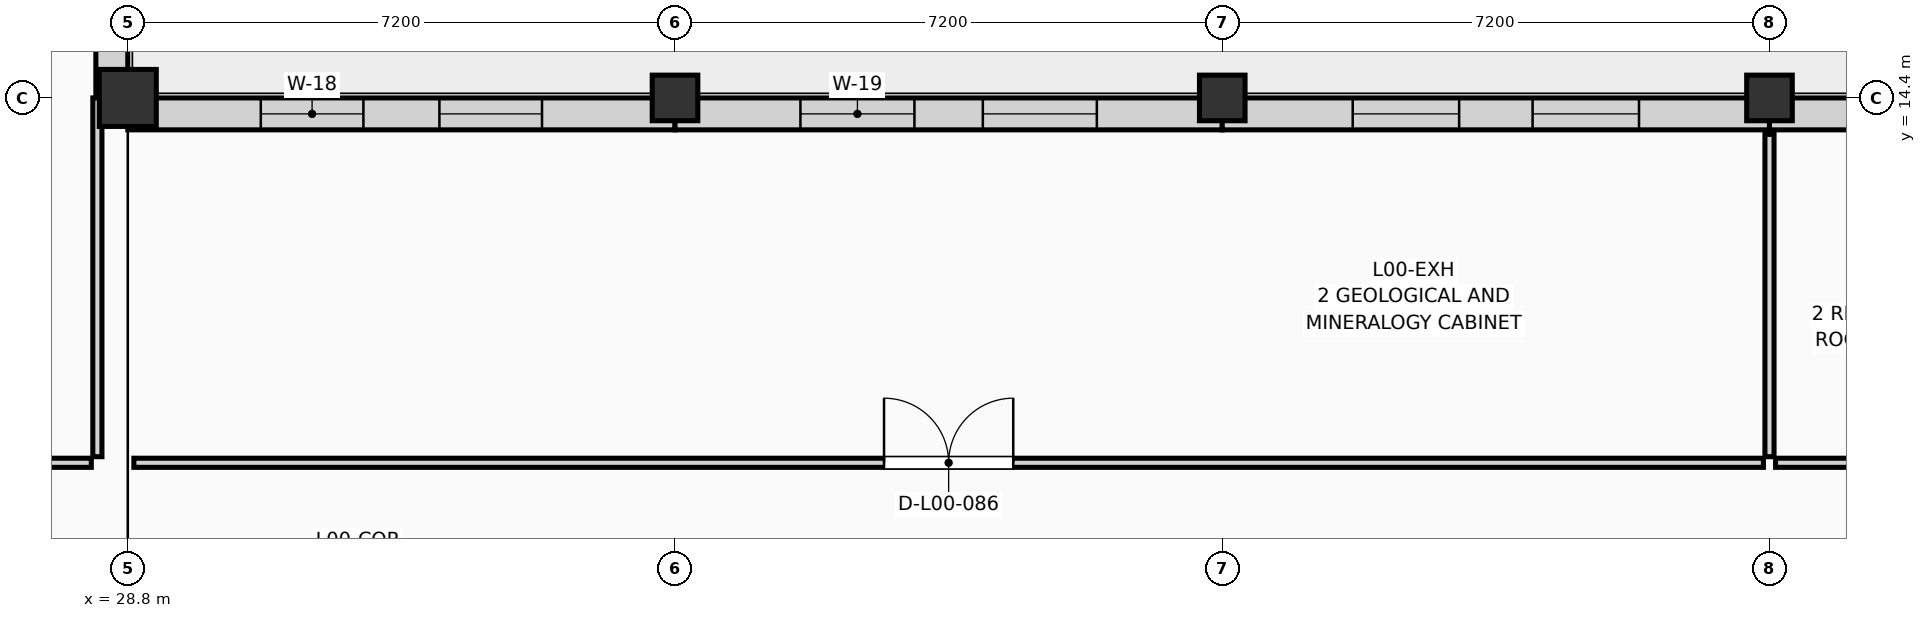
"""IFC4 building model, lengths in metres.
Left out: names, types, materials, properties, quantities, classifications, styles, units other than length and angle.
Written with IfcOpenShell. Run it as: python <this file> out.ifc"""

import sys

from ifc_helpers import new_model, si_unit, direction, frame, frame_2d, origin, origin_2d, place, context, subcontext, project, spatial, rectangle, extrude, element, fill, save


model = new_model("IFC4")
c1 = context("Model", 3, precision=1e-05, world=origin(), true_north=direction((0.0, 1.0)))
c2 = subcontext(c1, "Body", "Model", "MODEL_VIEW")
j1 = project(units=[si_unit("LENGTHUNIT", "METRE"), si_unit("PLANEANGLEUNIT", "RADIAN")], contexts=[c1])
p1 = place(None, origin())
s1 = spatial("IfcSite", under=j1, at=p1, CompositionType="ELEMENT")
p2 = place(p1, origin())
s2 = spatial("IfcBuilding", under=s1, at=p2, CompositionType="ELEMENT")
p3 = place(p2, origin())
s3 = spatial("IfcBuildingStorey", under=s2, at=p3, CompositionType="ELEMENT", Elevation=0.0)
p4 = place(p3, frame((28.8, 14.4, 0.0), z_axis=(0.0, 0.0, 1.0), x_axis=(1.0, 0.0, 0.0)))
e1 = element("IfcColumn", 1, at=p4, inside=s3, PredefinedType="COLUMN", context=c2, shape_type="SweptSolid", body=[
    extrude(rectangle(XDim=0.75, YDim=0.75, at=origin_2d()), origin(), (0.0, 0.0, 1.0), 4.5),
])
for number, where, z_axis, x_axis in (
    (2, (36.0, 14.4, 0.0), (0.0, 0.0, 1.0), (1.0, 0.0, 0.0)),
    (3, (43.2, 14.4, 0.0), (0.0, 0.0, 1.0), (1.0, 0.0, 0.0)),
    (4, (50.4, 14.4, 0.0), (0.0, 0.0, 1.0), (1.0, 0.0, 0.0)),
):
    element("IfcColumn", number, at=place(p3, frame(where, z_axis=z_axis, x_axis=x_axis)), inside=s3, PredefinedType="COLUMN", context=c2, shape_type="SweptSolid", body=[
        extrude(rectangle(XDim=0.6, YDim=0.6, at=origin_2d()), origin(), (0.0, 0.0, 1.0), 4.5),
    ])
p5 = place(p3, frame((28.59, 14.4, 0.0), z_axis=(0.0, 0.0, 1.0), x_axis=(0.0, 1.0, 0.0)))
e5 = element("IfcWall", 5, at=p5, inside=s3, PredefinedType="SOLIDWALL", context=c2, shape_type="SweptSolid", body=[
    extrude(rectangle(XDim=7.2, YDim=0.42, at=frame_2d((3.6, 0.0))), origin(), (0.0, 0.0, 1.0), 3.62),
])
p6 = place(p5, frame((0.962, 0.0, 0.18)))
e6 = element("IfcOpeningElement", 6, at=p6, cuts=e5, PredefinedType="OPENING", context=c2, shape_type="SweptSolid", body=[
    extrude(rectangle(XDim=1.55, YDim=3.25, at=frame_2d((0.775, 1.625))), frame((0.0, 0.222, 0.0), z_axis=(0.0, -1.0, 0.0), x_axis=(1.0, 0.0, 0.0)), (0.0, 0.0, 1.0), 0.444),
])
p7 = place(p5, frame((2.825, 0.0, 0.18)))
e7 = element("IfcOpeningElement", 7, at=p7, cuts=e5, PredefinedType="OPENING", context=c2, shape_type="SweptSolid", body=[
    extrude(rectangle(XDim=1.55, YDim=3.25, at=frame_2d((0.775, 1.625))), frame((0.0, 0.222, 0.0), z_axis=(0.0, -1.0, 0.0), x_axis=(1.0, 0.0, 0.0)), (0.0, 0.0, 1.0), 0.444),
])
p8 = place(p5, frame((4.688, 0.0, 0.18)))
e8 = element("IfcOpeningElement", 8, at=p8, cuts=e5, PredefinedType="OPENING", context=c2, shape_type="SweptSolid", body=[
    extrude(rectangle(XDim=1.55, YDim=3.25, at=frame_2d((0.775, 1.625))), frame((0.0, 0.222, 0.0), z_axis=(0.0, -1.0, 0.0), x_axis=(1.0, 0.0, 0.0)), (0.0, 0.0, 1.0), 0.444),
])
p9 = place(p3, frame((28.8, 14.19, 0.0), z_axis=(0.0, 0.0, 1.0), x_axis=(1.0, 0.0, 0.0)))
e9 = element("IfcWall", 9, at=p9, inside=s3, PredefinedType="SOLIDWALL", context=c2, shape_type="SweptSolid", body=[
    extrude(rectangle(XDim=7.2, YDim=0.42, at=frame_2d((3.6, 0.0))), origin(), (0.0, 0.0, 1.0), 3.62),
])
p10 = place(p9, frame((1.75, 0.0, 0.45)))
e10 = element("IfcOpeningElement", 10, at=p10, cuts=e9, PredefinedType="OPENING", context=c2, shape_type="SweptSolid", body=[
    extrude(rectangle(XDim=1.35, YDim=2.45, at=frame_2d((0.675, 1.225))), frame((0.0, 0.222, 0.0), z_axis=(0.0, -1.0, 0.0), x_axis=(1.0, 0.0, 0.0)), (0.0, 0.0, 1.0), 0.444),
])
p11 = place(p9, frame((4.1, 0.0, 0.45)))
e11 = element("IfcOpeningElement", 11, at=p11, cuts=e9, PredefinedType="OPENING", context=c2, shape_type="SweptSolid", body=[
    extrude(rectangle(XDim=1.35, YDim=2.45, at=frame_2d((0.675, 1.225))), frame((0.0, 0.222, 0.0), z_axis=(0.0, -1.0, 0.0), x_axis=(1.0, 0.0, 0.0)), (0.0, 0.0, 1.0), 0.444),
])
p12 = place(p3, frame((36.0, 14.19, 0.0), z_axis=(0.0, 0.0, 1.0), x_axis=(1.0, 0.0, 0.0)))
e12 = element("IfcWall", 12, at=p12, inside=s3, PredefinedType="SOLIDWALL", context=c2, shape_type="SweptSolid", body=[
    extrude(rectangle(XDim=7.2, YDim=0.42, at=frame_2d((3.6, 0.0))), origin(), (0.0, 0.0, 1.0), 3.62),
])
p13 = place(p12, frame((1.65, 0.0, 0.45)))
e13 = element("IfcOpeningElement", 13, at=p13, cuts=e12, PredefinedType="OPENING", context=c2, shape_type="SweptSolid", body=[
    extrude(rectangle(XDim=1.5, YDim=2.4, at=frame_2d((0.75, 1.2))), frame((0.0, 0.222, 0.0), z_axis=(0.0, -1.0, 0.0), x_axis=(1.0, 0.0, 0.0)), (0.0, 0.0, 1.0), 0.444),
])
p14 = place(p12, frame((4.05, 0.0, 0.45)))
e14 = element("IfcOpeningElement", 14, at=p14, cuts=e12, PredefinedType="OPENING", context=c2, shape_type="SweptSolid", body=[
    extrude(rectangle(XDim=1.5, YDim=2.4, at=frame_2d((0.75, 1.2))), frame((0.0, 0.222, 0.0), z_axis=(0.0, -1.0, 0.0), x_axis=(1.0, 0.0, 0.0)), (0.0, 0.0, 1.0), 0.444),
])
p15 = place(p3, frame((43.2, 14.19, 0.0), z_axis=(0.0, 0.0, 1.0), x_axis=(1.0, 0.0, 0.0)))
e15 = element("IfcWall", 15, at=p15, inside=s3, PredefinedType="SOLIDWALL", context=c2, shape_type="SweptSolid", body=[
    extrude(rectangle(XDim=7.2, YDim=0.42, at=frame_2d((3.6, 0.0))), origin(), (0.0, 0.0, 1.0), 3.62),
])
p16 = place(p15, frame((1.717, 0.0, 0.45)))
e16 = element("IfcOpeningElement", 16, at=p16, cuts=e15, PredefinedType="OPENING", context=c2, shape_type="SweptSolid", body=[
    extrude(rectangle(XDim=1.4, YDim=2.38, at=frame_2d((0.7, 1.19))), frame((0.0, 0.222, 0.0), z_axis=(0.0, -1.0, 0.0), x_axis=(1.0, 0.0, 0.0)), (0.0, 0.0, 1.0), 0.444),
])
p17 = place(p15, frame((4.083, 0.0, 0.45)))
e17 = element("IfcOpeningElement", 17, at=p17, cuts=e15, PredefinedType="OPENING", context=c2, shape_type="SweptSolid", body=[
    extrude(rectangle(XDim=1.4, YDim=2.38, at=frame_2d((0.7, 1.19))), frame((0.0, 0.222, 0.0), z_axis=(0.0, -1.0, 0.0), x_axis=(1.0, 0.0, 0.0)), (0.0, 0.0, 1.0), 0.444),
])
p18 = place(p3, frame((50.4, 14.19, 0.0), z_axis=(0.0, 0.0, 1.0), x_axis=(1.0, 0.0, 0.0)))
e18 = element("IfcWall", 18, at=p18, inside=s3, PredefinedType="SOLIDWALL", context=c2, shape_type="SweptSolid", body=[
    extrude(rectangle(XDim=7.2, YDim=0.42, at=frame_2d((3.6, 0.0))), origin(), (0.0, 0.0, 1.0), 3.62),
])
p19 = place(p18, frame((2.4, 0.0, 0.0)))
e19 = element("IfcOpeningElement", 19, at=p19, cuts=e18, PredefinedType="OPENING", context=c2, shape_type="SweptSolid", body=[
    extrude(rectangle(XDim=2.4, YDim=2.6, at=frame_2d((1.2, 1.3))), frame((0.0, 0.222, 0.0), z_axis=(0.0, -1.0, 0.0), x_axis=(1.0, 0.0, 0.0)), (0.0, 0.0, 1.0), 0.444),
])
p20 = place(p3, frame((20.48, 9.6, 0.0), z_axis=(0.0, 0.0, 1.0), x_axis=(1.0, 0.0, 0.0)))
e20 = element("IfcWall", 20, at=p20, inside=s3, PredefinedType="PARTITIONING", context=c2, shape_type="SweptSolid", body=[
    extrude(rectangle(XDim=7.84, YDim=0.12, at=frame_2d((3.92, 0.0))), origin(), (0.0, 0.0, 1.0), 4.235),
])
p21 = place(p20, frame((3.29, 0.0, 0.0)))
e21 = element("IfcOpeningElement", 21, at=p21, cuts=e20, PredefinedType="OPENING", context=c2, shape_type="SweptSolid", body=[
    extrude(rectangle(XDim=1.26, YDim=2.18, at=frame_2d((0.63, 1.09))), frame((0.0, 0.072, 0.0), z_axis=(0.0, -1.0, 0.0), x_axis=(1.0, 0.0, 0.0)), (0.0, 0.0, 1.0), 0.144),
])
p22 = place(p3, frame((28.4, 9.68, 0.0), z_axis=(0.0, 0.0, 1.0), x_axis=(0.0, 1.0, 0.0)))
e22 = element("IfcWall", 22, at=p22, inside=s3, PredefinedType="PARTITIONING", context=c2, shape_type="SweptSolid", body=[
    extrude(rectangle(XDim=4.72, YDim=0.12, at=frame_2d((2.36, 0.0))), origin(), (0.0, 0.0, 1.0), 3.385),
])
p23 = place(p3, frame((28.88, 9.6, 0.0), z_axis=(0.0, 0.0, 1.0), x_axis=(1.0, 0.0, 0.0)))
e23 = element("IfcWall", 23, at=p23, inside=s3, PredefinedType="PARTITIONING", context=c2, shape_type="SweptSolid", body=[
    extrude(rectangle(XDim=21.44, YDim=0.12, at=frame_2d((10.72, 0.0))), origin(), (0.0, 0.0, 1.0), 4.235),
])
p24 = place(p23, frame((9.87, 0.0, 0.0)))
e24 = element("IfcOpeningElement", 24, at=p24, cuts=e23, PredefinedType="OPENING", context=c2, shape_type="SweptSolid", body=[
    extrude(rectangle(XDim=1.7, YDim=2.28, at=frame_2d((0.85, 1.14))), frame((0.0, 0.072, 0.0), z_axis=(0.0, -1.0, 0.0), x_axis=(1.0, 0.0, 0.0)), (0.0, 0.0, 1.0), 0.144),
])
p25 = place(p3, frame((50.4, 9.68, 0.0), z_axis=(0.0, 0.0, 1.0), x_axis=(0.0, 1.0, 0.0)))
e25 = element("IfcWall", 25, at=p25, inside=s3, PredefinedType="PARTITIONING", context=c2, shape_type="SweptSolid", body=[
    extrude(rectangle(XDim=4.24, YDim=0.12, at=frame_2d((2.12, 0.0))), origin(), (0.0, 0.0, 1.0), 3.385),
])
p26 = place(p3, frame((50.48, 9.6, 0.0), z_axis=(0.0, 0.0, 1.0), x_axis=(1.0, 0.0, 0.0)))
e26 = element("IfcWall", 26, at=p26, inside=s3, PredefinedType="PARTITIONING", context=c2, shape_type="SweptSolid", body=[
    extrude(rectangle(XDim=13.84, YDim=0.12, at=frame_2d((6.92, 0.0))), origin(), (0.0, 0.0, 1.0), 4.235),
])
p27 = place(p26, frame((5.095, 0.0, 0.0)))
e27 = element("IfcOpeningElement", 27, at=p27, cuts=e26, PredefinedType="OPENING", context=c2, shape_type="SweptSolid", body=[
    extrude(rectangle(XDim=1.7, YDim=2.28, at=frame_2d((0.85, 1.14))), frame((0.0, 0.072, 0.0), z_axis=(0.0, -1.0, 0.0), x_axis=(1.0, 0.0, 0.0)), (0.0, 0.0, 1.0), 0.144),
])
p28 = place(p10, origin())
e28 = element("IfcWindow", 28, at=p28, inside=s3, PartitioningType="SINGLE_PANEL", PredefinedType="WINDOW", context=c2, shape_type="SweptSolid", body=[
    extrude(rectangle(XDim=1.35, YDim=2.45, at=frame_2d((0.675, 1.225))), frame((0.0, 0.03, 0.0), z_axis=(0.0, -1.0, 0.0), x_axis=(1.0, 0.0, 0.0)), (0.0, 0.0, 1.0), 0.06),
])
fill(e10, e28)
p29 = place(p11, origin())
e29 = element("IfcWindow", 29, at=p29, inside=s3, PartitioningType="SINGLE_PANEL", PredefinedType="WINDOW", context=c2, shape_type="SweptSolid", body=[
    extrude(rectangle(XDim=1.35, YDim=2.45, at=frame_2d((0.675, 1.225))), frame((0.0, 0.03, 0.0), z_axis=(0.0, -1.0, 0.0), x_axis=(1.0, 0.0, 0.0)), (0.0, 0.0, 1.0), 0.06),
])
fill(e11, e29)
p30 = place(p13, origin())
e30 = element("IfcWindow", 30, at=p30, inside=s3, PartitioningType="SINGLE_PANEL", PredefinedType="WINDOW", context=c2, shape_type="SweptSolid", body=[
    extrude(rectangle(XDim=1.5, YDim=2.4, at=frame_2d((0.75, 1.2))), frame((0.0, 0.03, 0.0), z_axis=(0.0, -1.0, 0.0), x_axis=(1.0, 0.0, 0.0)), (0.0, 0.0, 1.0), 0.06),
])
fill(e13, e30)
p31 = place(p14, origin())
e31 = element("IfcWindow", 31, at=p31, inside=s3, PartitioningType="SINGLE_PANEL", PredefinedType="WINDOW", context=c2, shape_type="SweptSolid", body=[
    extrude(rectangle(XDim=1.5, YDim=2.4, at=frame_2d((0.75, 1.2))), frame((0.0, 0.03, 0.0), z_axis=(0.0, -1.0, 0.0), x_axis=(1.0, 0.0, 0.0)), (0.0, 0.0, 1.0), 0.06),
])
fill(e14, e31)
p32 = place(p16, origin())
e32 = element("IfcWindow", 32, at=p32, inside=s3, PartitioningType="SINGLE_PANEL", PredefinedType="WINDOW", context=c2, shape_type="SweptSolid", body=[
    extrude(rectangle(XDim=1.4, YDim=2.38, at=frame_2d((0.7, 1.19))), frame((0.0, 0.03, 0.0), z_axis=(0.0, -1.0, 0.0), x_axis=(1.0, 0.0, 0.0)), (0.0, 0.0, 1.0), 0.06),
])
fill(e16, e32)
p33 = place(p17, origin())
e33 = element("IfcWindow", 33, at=p33, inside=s3, PartitioningType="SINGLE_PANEL", PredefinedType="WINDOW", context=c2, shape_type="SweptSolid", body=[
    extrude(rectangle(XDim=1.4, YDim=2.38, at=frame_2d((0.7, 1.19))), frame((0.0, 0.03, 0.0), z_axis=(0.0, -1.0, 0.0), x_axis=(1.0, 0.0, 0.0)), (0.0, 0.0, 1.0), 0.06),
])
fill(e17, e33)
p34 = place(p24, origin())
e34 = element("IfcDoor", 34, at=p34, inside=s3, OperationType="DOUBLE_DOOR_SINGLE_SWING", PredefinedType="DOOR", context=c2, shape_type="SweptSolid", body=[
    extrude(rectangle(XDim=1.7, YDim=2.28, at=frame_2d((0.85, 1.14))), frame((0.0, 0.025, 0.0), z_axis=(0.0, -1.0, 0.0), x_axis=(1.0, 0.0, 0.0)), (0.0, 0.0, 1.0), 0.05),
])
fill(e24, e34)
save(model, sys.argv[1])
